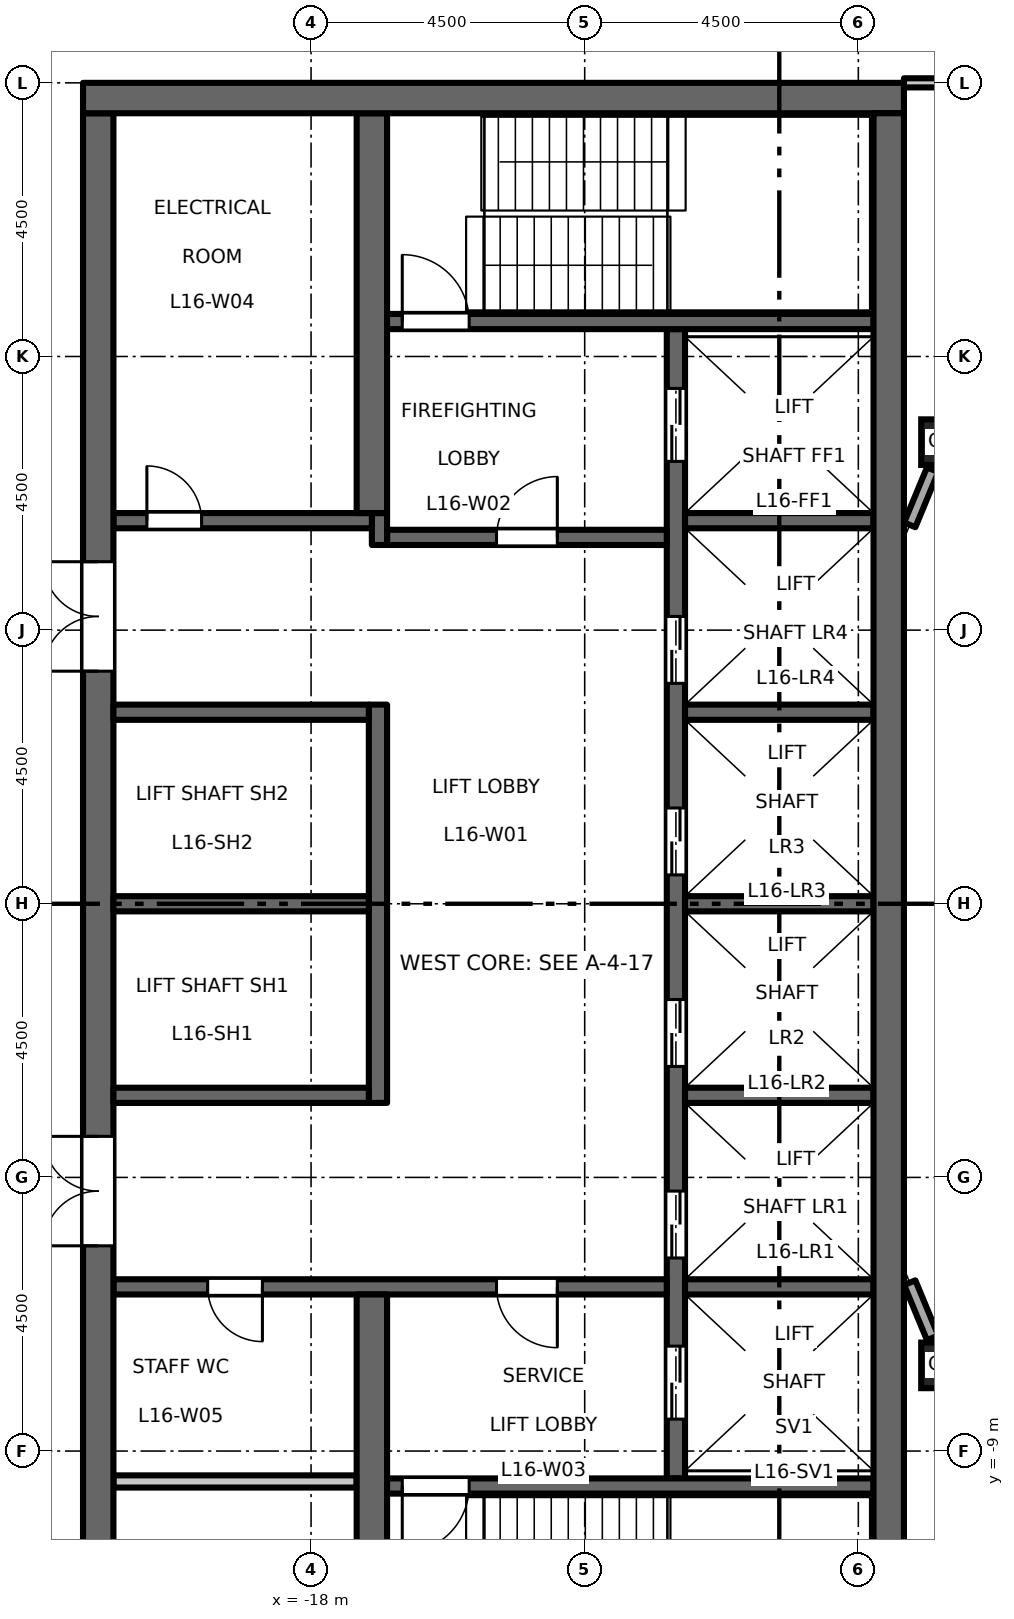
"""IFC4 building model, lengths in metres.
Left out: names, types, materials, properties, quantities, classifications, styles, units other than length and angle.
Written with IfcOpenShell. Run it as: python <this file> out.ifc"""

import sys

from ifc_helpers import new_model, si_unit, direction, frame, frame_2d, origin, origin_2d, place, context, subcontext, project, spatial, rectangle, hollow_rectangle, extrude, element, fill, save


model = new_model("IFC4")
c1 = context("Model", 3, precision=1e-05, world=origin(), true_north=direction((0.0, 1.0)))
c2 = subcontext(c1, "Body", "Model", "MODEL_VIEW")
j1 = project(units=[si_unit("LENGTHUNIT", "METRE"), si_unit("PLANEANGLEUNIT", "RADIAN")], contexts=[c1])
p1 = place(None, origin())
s1 = spatial("IfcSite", under=j1, at=p1, CompositionType="ELEMENT")
p2 = place(p1, origin())
s2 = spatial("IfcBuilding", under=s1, at=p2, CompositionType="ELEMENT")
p3 = place(p2, frame((0.0, 0.0, 76.2)))
s3 = spatial("IfcBuildingStorey", under=s2, at=p3, CompositionType="ELEMENT", Elevation=76.2)
for number, where, z_axis, x_axis in (
    (1, (-7.591, -7.591, 0.0), (0.0, 0.0, 1.0), (1.0, 0.0, 0.0)),
    (2, (-7.591, 7.591, 0.0), (0.0, 0.0, 1.0), (1.0, 0.0, 0.0)),
):
    element("IfcColumn", number, at=place(p3, frame(where, z_axis=z_axis, x_axis=x_axis)), inside=s3, PredefinedType="COLUMN", context=c2, shape_type="SweptSolid", body=[
        extrude(hollow_rectangle(XDim=0.75, YDim=0.75, WallThickness=0.045, at=origin_2d()), origin(), (0.0, 0.0, 1.0), 4.5),
    ])
p4 = place(p3, frame((-12.0, -9.45, 0.0), z_axis=(0.0, 0.0, 1.0), x_axis=(0.0, 1.0, 0.0)))
e3 = element("IfcWall", 3, at=p4, inside=s3, PredefinedType="SHEAR", context=c2, shape_type="SweptSolid", body=[
    extrude(rectangle(XDim=18.9, YDim=0.3, at=frame_2d((9.45, 0.0))), origin(), (0.0, 0.0, 1.0), 4.35),
])
p5 = place(p4, frame((3.625, 0.0, 0.0)))
e4 = element("IfcOpeningElement", 4, at=p5, cuts=e3, PredefinedType="OPENING", context=c2, shape_type="SweptSolid", body=[
    extrude(rectangle(XDim=1.1, YDim=2.1, at=frame_2d((0.55, 1.05))), frame((0.0, 0.16, 0.0), z_axis=(0.0, -1.0, 0.0), x_axis=(1.0, 0.0, 0.0)), (0.0, 0.0, 1.0), 0.32),
])
p6 = place(p4, frame((6.775, 0.0, 0.0)))
e5 = element("IfcOpeningElement", 5, at=p6, cuts=e3, PredefinedType="OPENING", context=c2, shape_type="SweptSolid", body=[
    extrude(rectangle(XDim=1.1, YDim=2.1, at=frame_2d((0.55, 1.05))), frame((0.0, 0.16, 0.0), z_axis=(0.0, -1.0, 0.0), x_axis=(1.0, 0.0, 0.0)), (0.0, 0.0, 1.0), 0.32),
])
p7 = place(p4, frame((9.925, 0.0, 0.0)))
e6 = element("IfcOpeningElement", 6, at=p7, cuts=e3, PredefinedType="OPENING", context=c2, shape_type="SweptSolid", body=[
    extrude(rectangle(XDim=1.1, YDim=2.1, at=frame_2d((0.55, 1.05))), frame((0.0, 0.16, 0.0), z_axis=(0.0, -1.0, 0.0), x_axis=(1.0, 0.0, 0.0)), (0.0, 0.0, 1.0), 0.32),
])
p8 = place(p4, frame((13.075, 0.0, 0.0)))
e7 = element("IfcOpeningElement", 7, at=p8, cuts=e3, PredefinedType="OPENING", context=c2, shape_type="SweptSolid", body=[
    extrude(rectangle(XDim=1.1, YDim=2.1, at=frame_2d((0.55, 1.05))), frame((0.0, 0.16, 0.0), z_axis=(0.0, -1.0, 0.0), x_axis=(1.0, 0.0, 0.0)), (0.0, 0.0, 1.0), 0.32),
])
p9 = place(p4, frame((16.725, 0.0, 0.0)))
e8 = element("IfcOpeningElement", 8, at=p9, cuts=e3, PredefinedType="OPENING", context=c2, shape_type="SweptSolid", body=[
    extrude(rectangle(XDim=1.2, YDim=2.1, at=frame_2d((0.6, 1.05))), frame((0.0, 0.16, 0.0), z_axis=(0.0, -1.0, 0.0), x_axis=(1.0, 0.0, 0.0)), (0.0, 0.0, 1.0), 0.32),
])
p10 = place(p4, frame((0.975, 0.0, 0.0)))
e9 = element("IfcOpeningElement", 9, at=p10, cuts=e3, PredefinedType="OPENING", context=c2, shape_type="SweptSolid", body=[
    extrude(rectangle(XDim=1.2, YDim=2.1, at=frame_2d((0.6, 1.05))), frame((0.0, 0.16, 0.0), z_axis=(0.0, -1.0, 0.0), x_axis=(1.0, 0.0, 0.0)), (0.0, 0.0, 1.0), 0.32),
])
p11 = place(p3, frame((-12.15, 6.025, 0.0), z_axis=(0.0, 0.0, 1.0), x_axis=(-1.0, 0.0, 0.0)))
e10 = element("IfcWall", 10, at=p11, inside=s3, PredefinedType="SHEAR", context=c2, shape_type="SweptSolid", body=[
    extrude(rectangle(XDim=4.6, YDim=0.25, at=frame_2d((2.3, 0.0))), origin(), (0.0, 0.0, 1.0), 4.35),
])
p12 = place(p11, frame((1.8, 0.0, 0.0)))
e11 = element("IfcOpeningElement", 11, at=p12, cuts=e10, PredefinedType="OPENING", context=c2, shape_type="SweptSolid", body=[
    extrude(rectangle(XDim=1.0, YDim=2.1, at=frame_2d((0.5, 1.05))), frame((0.0, 0.135, 0.0), z_axis=(0.0, -1.0, 0.0), x_axis=(1.0, 0.0, 0.0)), (0.0, 0.0, 1.0), 0.27),
])
p13 = place(p3, frame((-16.875, 5.9, 0.0), z_axis=(0.0, 0.0, 1.0), x_axis=(0.0, 1.0, 0.0)))
e12 = element("IfcWall", 12, at=p13, inside=s3, PredefinedType="SHEAR", context=c2, shape_type="SweptSolid", body=[
    extrude(rectangle(XDim=0.525, YDim=0.25, at=frame_2d((0.263, 0.0))), origin(), (0.0, 0.0, 1.0), 4.35),
])
p14 = place(p3, frame((-17.0, 6.3, 0.0), z_axis=(0.0, 0.0, 1.0), x_axis=(-1.0, 0.0, 0.0)))
e13 = element("IfcWall", 13, at=p14, inside=s3, PredefinedType="SHEAR", context=c2, shape_type="SweptSolid", body=[
    extrude(rectangle(XDim=4.25, YDim=0.25, at=frame_2d((2.125, 0.0))), origin(), (0.0, 0.0, 1.0), 4.35),
])
p15 = place(p14, frame((2.8, 0.0, 0.0)))
e14 = element("IfcOpeningElement", 14, at=p15, cuts=e13, PredefinedType="OPENING", context=c2, shape_type="SweptSolid", body=[
    extrude(rectangle(XDim=0.9, YDim=2.1, at=frame_2d((0.45, 1.05))), frame((0.0, 0.135, 0.0), z_axis=(0.0, -1.0, 0.0), x_axis=(1.0, 0.0, 0.0)), (0.0, 0.0, 1.0), 0.27),
])
p16 = place(p3, frame((-12.15, -6.3, 0.0), z_axis=(0.0, 0.0, 1.0), x_axis=(-1.0, 0.0, 0.0)))
e15 = element("IfcWall", 15, at=p16, inside=s3, PredefinedType="SHEAR", context=c2, shape_type="SweptSolid", body=[
    extrude(rectangle(XDim=9.1, YDim=0.25, at=frame_2d((4.55, 0.0))), origin(), (0.0, 0.0, 1.0), 4.35),
])
p17 = place(p16, frame((1.8, 0.0, 0.0)))
e16 = element("IfcOpeningElement", 16, at=p17, cuts=e15, PredefinedType="OPENING", context=c2, shape_type="SweptSolid", body=[
    extrude(rectangle(XDim=1.0, YDim=2.1, at=frame_2d((0.5, 1.05))), frame((0.0, 0.135, 0.0), z_axis=(0.0, -1.0, 0.0), x_axis=(1.0, 0.0, 0.0)), (0.0, 0.0, 1.0), 0.27),
])
p18 = place(p16, frame((6.65, 0.0, 0.0)))
e17 = element("IfcOpeningElement", 17, at=p18, cuts=e15, PredefinedType="OPENING", context=c2, shape_type="SweptSolid", body=[
    extrude(rectangle(XDim=0.9, YDim=2.1, at=frame_2d((0.45, 1.05))), frame((0.0, 0.135, 0.0), z_axis=(0.0, -1.0, 0.0), x_axis=(1.0, 0.0, 0.0)), (0.0, 0.0, 1.0), 0.27),
])
p19 = place(p3, frame((-21.5, -13.0, 0.0), z_axis=(0.0, 0.0, 1.0), x_axis=(0.0, 1.0, 0.0)))
e18 = element("IfcWall", 18, at=p19, inside=s3, PredefinedType="SHEAR", context=c2, shape_type="SweptSolid", body=[
    extrude(rectangle(XDim=26.0, YDim=0.5, at=frame_2d((13.0, 0.0))), origin(), (0.0, 0.0, 1.0), 4.35),
])
p20 = place(p19, frame((16.825, 0.0, 0.0)))
e19 = element("IfcOpeningElement", 19, at=p20, cuts=e18, PredefinedType="OPENING", context=c2, shape_type="SweptSolid", body=[
    extrude(rectangle(XDim=1.8, YDim=2.1, at=frame_2d((0.9, 1.05))), frame((0.0, 0.26, 0.0), z_axis=(0.0, -1.0, 0.0), x_axis=(1.0, 0.0, 0.0)), (0.0, 0.0, 1.0), 0.52),
])
p21 = place(p19, frame((7.375, 0.0, 0.0)))
e20 = element("IfcOpeningElement", 20, at=p21, cuts=e18, PredefinedType="OPENING", context=c2, shape_type="SweptSolid", body=[
    extrude(rectangle(XDim=1.8, YDim=2.1, at=frame_2d((0.9, 1.05))), frame((0.0, 0.26, 0.0), z_axis=(0.0, -1.0, 0.0), x_axis=(1.0, 0.0, 0.0)), (0.0, 0.0, 1.0), 0.52),
])
p22 = place(p19, frame((1.3, 0.0, 0.0)))
e21 = element("IfcOpeningElement", 21, at=p22, cuts=e18, PredefinedType="OPENING", context=c2, shape_type="SweptSolid", body=[
    extrude(rectangle(XDim=0.9, YDim=2.1, at=frame_2d((0.45, 1.05))), frame((0.0, 0.26, 0.0), z_axis=(0.0, -1.0, 0.0), x_axis=(1.0, 0.0, 0.0)), (0.0, 0.0, 1.0), 0.52),
])
p23 = place(p3, frame((-17.25, -9.5, 0.0), z_axis=(0.0, 0.0, 1.0), x_axis=(-1.0, 0.0, 0.0)))
e22 = element("IfcWall", 22, at=p23, inside=s3, PredefinedType="PARTITIONING", context=c2, shape_type="SweptSolid", body=[
    extrude(rectangle(XDim=4.0, YDim=0.2, at=frame_2d((2.0, 0.0))), origin(), (0.0, 0.0, 1.0), 4.35),
])
p24 = place(p3, frame((-16.9, -3.275, 0.0), z_axis=(0.0, 0.0, 1.0), x_axis=(0.0, 1.0, 0.0)))
e23 = element("IfcWall", 23, at=p24, inside=s3, PredefinedType="SHEAR", context=c2, shape_type="SweptSolid", body=[
    extrude(rectangle(XDim=6.55, YDim=0.3, at=frame_2d((3.275, 0.0))), origin(), (0.0, 0.0, 1.0), 4.35),
])
for number, where, z_axis, x_axis in (
    (24, (-17.05, 0.0, 0.0), (0.0, 0.0, 1.0), (-1.0, 0.0, 0.0)),
    (25, (-17.05, 3.15, 0.0), (0.0, 0.0, 1.0), (-1.0, 0.0, 0.0)),
    (26, (-17.05, -3.15, 0.0), (0.0, 0.0, 1.0), (-1.0, 0.0, 0.0)),
):
    element("IfcWall", number, at=place(p3, frame(where, z_axis=z_axis, x_axis=x_axis)), inside=s3, PredefinedType="SHEAR", context=c2, shape_type="SweptSolid", body=[
        extrude(rectangle(XDim=4.2, YDim=0.25, at=frame_2d((2.1, 0.0))), origin(), (0.0, 0.0, 1.0), 4.35),
    ])
for number, where, z_axis, x_axis in (
    (27, (-17.0, 6.425, 0.0), (0.0, 0.0, 1.0), (0.0, 1.0, 0.0)),
    (28, (-17.0, -13.0, 0.0), (0.0, 0.0, 1.0), (0.0, 1.0, 0.0)),
):
    element("IfcWall", number, at=place(p3, frame(where, z_axis=z_axis, x_axis=x_axis)), inside=s3, PredefinedType="SHEAR", context=c2, shape_type="SweptSolid", body=[
        extrude(rectangle(XDim=6.575, YDim=0.5, at=frame_2d((3.288, 0.0))), origin(), (0.0, 0.0, 1.0), 4.35),
    ])
for number, where, z_axis, x_axis in (
    (29, (-8.75, 0.0, 0.0), (0.0, 0.0, 1.0), (-1.0, 0.0, 0.0)),
    (30, (-8.75, 3.15, 0.0), (0.0, 0.0, 1.0), (-1.0, 0.0, 0.0)),
    (31, (-8.75, 6.3, 0.0), (0.0, 0.0, 1.0), (-1.0, 0.0, 0.0)),
    (32, (-8.75, -3.15, 0.0), (0.0, 0.0, 1.0), (-1.0, 0.0, 0.0)),
    (33, (-8.75, -6.3, 0.0), (0.0, 0.0, 1.0), (-1.0, 0.0, 0.0)),
):
    element("IfcWall", number, at=place(p3, frame(where, z_axis=z_axis, x_axis=x_axis)), inside=s3, PredefinedType="SHEAR", context=c2, shape_type="SweptSolid", body=[
        extrude(rectangle(XDim=3.1, YDim=0.25, at=frame_2d((1.55, 0.0))), origin(), (0.0, 0.0, 1.0), 4.35),
    ])
p25 = place(p3, frame((-8.75, 9.575, 0.0), z_axis=(0.0, 0.0, 1.0), x_axis=(-1.0, 0.0, 0.0)))
e34 = element("IfcWall", 34, at=p25, inside=s3, PredefinedType="SHEAR", context=c2, shape_type="SweptSolid", body=[
    extrude(rectangle(XDim=8.0, YDim=0.25, at=frame_2d((4.0, 0.0))), origin(), (0.0, 0.0, 1.0), 4.35),
])
p26 = place(p25, frame((6.65, 0.0, 0.0)))
e35 = element("IfcOpeningElement", 35, at=p26, cuts=e34, PredefinedType="OPENING", context=c2, shape_type="SweptSolid", body=[
    extrude(rectangle(XDim=1.1, YDim=2.1, at=frame_2d((0.55, 1.05))), frame((0.0, 0.135, 0.0), z_axis=(0.0, -1.0, 0.0), x_axis=(1.0, 0.0, 0.0)), (0.0, 0.0, 1.0), 0.27),
])
p27 = place(p3, frame((-8.75, -9.575, 0.0), z_axis=(0.0, 0.0, 1.0), x_axis=(-1.0, 0.0, 0.0)))
e36 = element("IfcWall", 36, at=p27, inside=s3, PredefinedType="SHEAR", context=c2, shape_type="SweptSolid", body=[
    extrude(rectangle(XDim=8.0, YDim=0.25, at=frame_2d((4.0, 0.0))), origin(), (0.0, 0.0, 1.0), 4.35),
])
p28 = place(p27, frame((6.65, 0.0, 0.0)))
e37 = element("IfcOpeningElement", 37, at=p28, cuts=e36, PredefinedType="OPENING", context=c2, shape_type="SweptSolid", body=[
    extrude(rectangle(XDim=1.1, YDim=2.1, at=frame_2d((0.55, 1.05))), frame((0.0, 0.135, 0.0), z_axis=(0.0, -1.0, 0.0), x_axis=(1.0, 0.0, 0.0)), (0.0, 0.0, 1.0), 0.27),
])
p29 = place(p3, frame((-8.25, 13.25, 0.0), z_axis=(0.0, 0.0, 1.0), x_axis=(-1.0, 0.0, 0.0)))
e38 = element("IfcWall", 38, at=p29, inside=s3, PredefinedType="SHEAR", context=c2, shape_type="SweptSolid", body=[
    extrude(rectangle(XDim=13.5, YDim=0.5, at=frame_2d((6.75, 0.0))), origin(), (0.0, 0.0, 1.0), 4.35),
])
p30 = place(p3, frame((-8.5, -13.0, 0.0), z_axis=(0.0, 0.0, 1.0), x_axis=(0.0, 1.0, 0.0)))
e39 = element("IfcWall", 39, at=p30, inside=s3, PredefinedType="SHEAR", context=c2, shape_type="SweptSolid", body=[
    extrude(rectangle(XDim=26.0, YDim=0.5, at=frame_2d((13.0, 0.0))), origin(), (0.0, 0.0, 1.0), 4.35),
])
for number, where, z_axis, x_axis in (
    (40, (-7.779, 7.138, 0.0), (0.0, 0.0, 1.0), (-0.383, -0.924, 0.0)),
    (41, (-8.154, -6.231, 0.0), (0.0, 0.0, 1.0), (0.383, -0.924, 0.0)),
):
    element("IfcWall", number, at=place(p3, frame(where, z_axis=z_axis, x_axis=x_axis)), inside=s3, PredefinedType="STANDARD", context=c2, shape_type="SweptSolid", body=[
        extrude(rectangle(XDim=0.982, YDim=0.2, at=frame_2d((0.491, 0.0))), origin(), (0.0, 0.0, 1.0), 3.73),
    ])
p31 = place(p3, frame((-8.25, 13.5, 0.0), z_axis=(0.0, 0.0, 1.0), x_axis=(1.0, 0.0, 0.0)))
e42 = element("IfcWall", 42, at=p31, inside=s3, PredefinedType="PARTITIONING", context=c2, shape_type="SweptSolid", body=[
    extrude(rectangle(XDim=16.5, YDim=0.15, at=frame_2d((8.25, 0.0))), origin(), (0.0, 0.0, 1.0), 3.85),
])
p32 = place(p31, frame((1.4, 0.0, 0.0)))
e43 = element("IfcOpeningElement", 43, at=p32, cuts=e42, PredefinedType="OPENING", context=c2, shape_type="SweptSolid", body=[
    extrude(rectangle(XDim=1.0, YDim=2.1, at=frame_2d((0.5, 1.05))), frame((0.0, 0.085, 0.0), z_axis=(0.0, -1.0, 0.0), x_axis=(1.0, 0.0, 0.0)), (0.0, 0.0, 1.0), 0.17),
])
p33 = place(p31, frame((9.65, 0.0, 0.0)))
e44 = element("IfcOpeningElement", 44, at=p33, cuts=e42, PredefinedType="OPENING", context=c2, shape_type="SweptSolid", body=[
    extrude(rectangle(XDim=1.0, YDim=2.1, at=frame_2d((0.5, 1.05))), frame((0.0, 0.085, 0.0), z_axis=(0.0, -1.0, 0.0), x_axis=(1.0, 0.0, 0.0)), (0.0, 0.0, 1.0), 0.17),
])
p34 = place(p12, origin())
e45 = element("IfcDoor", 45, at=p34, inside=s3, OperationType="SINGLE_SWING_LEFT", PredefinedType="DOOR", context=c2, shape_type="SweptSolid", body=[
    extrude(rectangle(XDim=1.0, YDim=2.1, at=frame_2d((0.5, 1.05))), frame((0.0, 0.025, 0.0), z_axis=(0.0, -1.0, 0.0), x_axis=(1.0, 0.0, 0.0)), (0.0, 0.0, 1.0), 0.05),
])
fill(e11, e45)
p35 = place(p17, origin())
e46 = element("IfcDoor", 46, at=p35, inside=s3, OperationType="SINGLE_SWING_RIGHT", PredefinedType="DOOR", context=c2, shape_type="SweptSolid", body=[
    extrude(rectangle(XDim=1.0, YDim=2.1, at=frame_2d((0.5, 1.05))), frame((0.0, 0.025, 0.0), z_axis=(0.0, -1.0, 0.0), x_axis=(1.0, 0.0, 0.0)), (0.0, 0.0, 1.0), 0.05),
])
fill(e16, e46)
p36 = place(p26, origin())
e47 = element("IfcDoor", 47, at=p36, inside=s3, OperationType="SINGLE_SWING_RIGHT", PredefinedType="DOOR", context=c2, shape_type="SweptSolid", body=[
    extrude(rectangle(XDim=1.1, YDim=2.1, at=frame_2d((0.55, 1.05))), frame((0.0, 0.025, 0.0), z_axis=(0.0, -1.0, 0.0), x_axis=(1.0, 0.0, 0.0)), (0.0, 0.0, 1.0), 0.05),
])
fill(e35, e47)
p37 = place(p28, origin())
e48 = element("IfcDoor", 48, at=p37, inside=s3, OperationType="SINGLE_SWING_LEFT", PredefinedType="DOOR", context=c2, shape_type="SweptSolid", body=[
    extrude(rectangle(XDim=1.1, YDim=2.1, at=frame_2d((0.55, 1.05))), frame((0.0, 0.025, 0.0), z_axis=(0.0, -1.0, 0.0), x_axis=(1.0, 0.0, 0.0)), (0.0, 0.0, 1.0), 0.05),
])
fill(e37, e48)
p38 = place(p20, origin())
e49 = element("IfcDoor", 49, at=p38, inside=s3, OperationType="DOUBLE_DOOR_DOUBLE_SWING", PredefinedType="DOOR", context=c2, shape_type="SweptSolid", body=[
    extrude(rectangle(XDim=1.8, YDim=2.1, at=frame_2d((0.9, 1.05))), frame((0.0, 0.025, 0.0), z_axis=(0.0, -1.0, 0.0), x_axis=(1.0, 0.0, 0.0)), (0.0, 0.0, 1.0), 0.05),
])
fill(e19, e49)
p39 = place(p21, origin())
e50 = element("IfcDoor", 50, at=p39, inside=s3, OperationType="DOUBLE_DOOR_DOUBLE_SWING", PredefinedType="DOOR", context=c2, shape_type="SweptSolid", body=[
    extrude(rectangle(XDim=1.8, YDim=2.1, at=frame_2d((0.9, 1.05))), frame((0.0, 0.025, 0.0), z_axis=(0.0, -1.0, 0.0), x_axis=(1.0, 0.0, 0.0)), (0.0, 0.0, 1.0), 0.05),
])
fill(e20, e50)
p40 = place(p5, origin())
e51 = element("IfcDoor", 51, at=p40, inside=s3, OperationType="DOUBLE_DOOR_SLIDING", PredefinedType="DOOR", context=c2, shape_type="SweptSolid", body=[
    extrude(rectangle(XDim=1.1, YDim=2.1, at=frame_2d((0.55, 1.05))), frame((0.0, 0.025, 0.0), z_axis=(0.0, -1.0, 0.0), x_axis=(1.0, 0.0, 0.0)), (0.0, 0.0, 1.0), 0.05),
])
fill(e4, e51)
p41 = place(p6, origin())
e52 = element("IfcDoor", 52, at=p41, inside=s3, OperationType="DOUBLE_DOOR_SLIDING", PredefinedType="DOOR", context=c2, shape_type="SweptSolid", body=[
    extrude(rectangle(XDim=1.1, YDim=2.1, at=frame_2d((0.55, 1.05))), frame((0.0, 0.025, 0.0), z_axis=(0.0, -1.0, 0.0), x_axis=(1.0, 0.0, 0.0)), (0.0, 0.0, 1.0), 0.05),
])
fill(e5, e52)
p42 = place(p7, origin())
e53 = element("IfcDoor", 53, at=p42, inside=s3, OperationType="DOUBLE_DOOR_SLIDING", PredefinedType="DOOR", context=c2, shape_type="SweptSolid", body=[
    extrude(rectangle(XDim=1.1, YDim=2.1, at=frame_2d((0.55, 1.05))), frame((0.0, 0.025, 0.0), z_axis=(0.0, -1.0, 0.0), x_axis=(1.0, 0.0, 0.0)), (0.0, 0.0, 1.0), 0.05),
])
fill(e6, e53)
p43 = place(p8, origin())
e54 = element("IfcDoor", 54, at=p43, inside=s3, OperationType="DOUBLE_DOOR_SLIDING", PredefinedType="DOOR", context=c2, shape_type="SweptSolid", body=[
    extrude(rectangle(XDim=1.1, YDim=2.1, at=frame_2d((0.55, 1.05))), frame((0.0, 0.025, 0.0), z_axis=(0.0, -1.0, 0.0), x_axis=(1.0, 0.0, 0.0)), (0.0, 0.0, 1.0), 0.05),
])
fill(e7, e54)
p44 = place(p9, origin())
e55 = element("IfcDoor", 55, at=p44, inside=s3, OperationType="DOUBLE_DOOR_SLIDING", PredefinedType="DOOR", context=c2, shape_type="SweptSolid", body=[
    extrude(rectangle(XDim=1.2, YDim=2.1, at=frame_2d((0.6, 1.05))), frame((0.0, 0.025, 0.0), z_axis=(0.0, -1.0, 0.0), x_axis=(1.0, 0.0, 0.0)), (0.0, 0.0, 1.0), 0.05),
])
fill(e8, e55)
p45 = place(p10, origin())
e56 = element("IfcDoor", 56, at=p45, inside=s3, OperationType="DOUBLE_DOOR_SLIDING", PredefinedType="DOOR", context=c2, shape_type="SweptSolid", body=[
    extrude(rectangle(XDim=1.2, YDim=2.1, at=frame_2d((0.6, 1.05))), frame((0.0, 0.025, 0.0), z_axis=(0.0, -1.0, 0.0), x_axis=(1.0, 0.0, 0.0)), (0.0, 0.0, 1.0), 0.05),
])
fill(e9, e56)
p46 = place(p15, origin())
e57 = element("IfcDoor", 57, at=p46, inside=s3, OperationType="SINGLE_SWING_RIGHT", PredefinedType="DOOR", context=c2, shape_type="SweptSolid", body=[
    extrude(rectangle(XDim=0.9, YDim=2.1, at=frame_2d((0.45, 1.05))), frame((0.0, 0.025, 0.0), z_axis=(0.0, -1.0, 0.0), x_axis=(1.0, 0.0, 0.0)), (0.0, 0.0, 1.0), 0.05),
])
fill(e14, e57)
p47 = place(p18, origin())
e58 = element("IfcDoor", 58, at=p47, inside=s3, OperationType="SINGLE_SWING_RIGHT", PredefinedType="DOOR", context=c2, shape_type="SweptSolid", body=[
    extrude(rectangle(XDim=0.9, YDim=2.1, at=frame_2d((0.45, 1.05))), frame((0.0, 0.025, 0.0), z_axis=(0.0, -1.0, 0.0), x_axis=(1.0, 0.0, 0.0)), (0.0, 0.0, 1.0), 0.05),
])
fill(e17, e58)
save(model, sys.argv[1])
